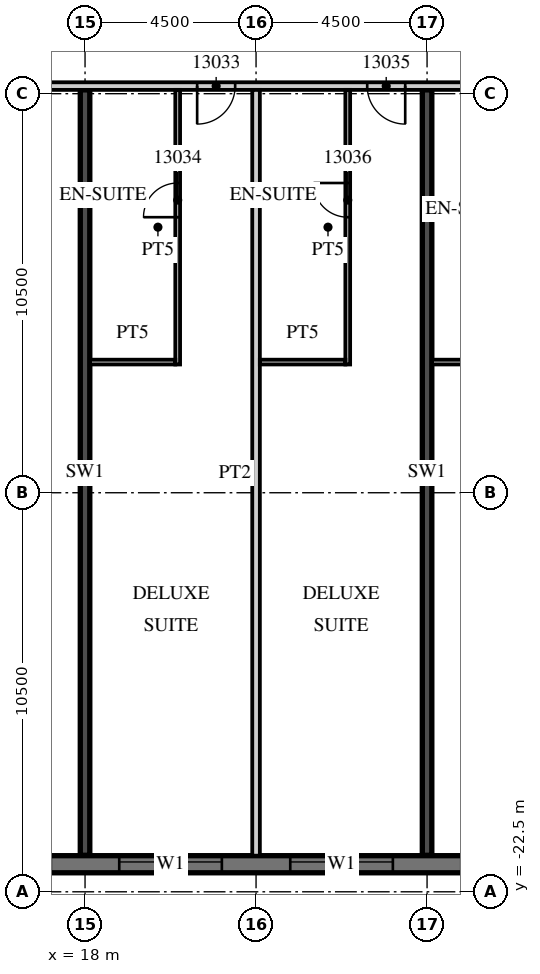
"""IFC4 building model, lengths in metres.
Left out: names, types, materials, properties, quantities, classifications, styles, units other than length and angle.
Written with IfcOpenShell. Run it as: python <this file> out.ifc"""

import sys

from ifc_helpers import new_model, si_unit, direction, frame, frame_2d, origin, place, context, subcontext, project, spatial, rectangle, extrude, element, fill, save


model = new_model("IFC4")
c1 = context("Model", 3, precision=1e-05, world=origin(), true_north=direction((0.0, 1.0)))
c2 = subcontext(c1, "Body", "Model", "MODEL_VIEW")
j1 = project(units=[si_unit("LENGTHUNIT", "METRE"), si_unit("PLANEANGLEUNIT", "RADIAN")], contexts=[c1])
p1 = place(None, origin())
s1 = spatial("IfcSite", under=j1, at=p1, CompositionType="ELEMENT")
p2 = place(p1, origin())
s2 = spatial("IfcBuilding", under=s1, at=p2, CompositionType="ELEMENT")
p3 = place(p2, frame((0.0, 0.0, 73.2)))
s3 = spatial("IfcBuildingStorey", under=s2, at=p3, CompositionType="ELEMENT", Elevation=73.2)
for number, where, z_axis, x_axis in (
    (1, (18.0, -21.54, 0.0), (0.0, 0.0, 1.0), (0.0, 1.0, 0.0)),
    (2, (27.0, -21.54, 0.0), (0.0, 0.0, 1.0), (0.0, 1.0, 0.0)),
):
    element("IfcWall", number, at=place(p3, frame(where, z_axis=z_axis, x_axis=x_axis)), inside=s3, PredefinedType="SHEAR", context=c2, shape_type="SweptSolid", body=[
        extrude(rectangle(XDim=20.14, YDim=0.25, at=frame_2d((10.07, 0.0))), origin(), (0.0, 0.0, 1.0), 3.3),
    ])
p4 = place(p3, frame((-13.5, -21.775, 0.0), z_axis=(0.0, 0.0, 1.0), x_axis=(1.0, 0.0, 0.0)))
e3 = element("IfcWall", 3, at=p4, inside=s3, PredefinedType="SOLIDWALL", context=c2, shape_type="SweptSolid", body=[
    extrude(rectangle(XDim=54.5, YDim=0.45, at=frame_2d((27.25, 0.0))), origin(), (0.0, 0.0, 1.0), 3.02),
])
p5 = place(p4, frame((0.9, 0.0, 0.45)))
e4 = element("IfcOpeningElement", 4, at=p5, cuts=e3, PredefinedType="OPENING", context=c2, shape_type="SweptSolid", body=[
    extrude(rectangle(XDim=2.7, YDim=2.25, at=frame_2d((1.35, 1.125))), frame((0.0, 0.235, 0.0), z_axis=(0.0, -1.0, 0.0), x_axis=(1.0, 0.0, 0.0)), (0.0, 0.0, 1.0), 0.47),
])
p6 = place(p4, frame((5.4, 0.0, 0.45)))
e5 = element("IfcOpeningElement", 5, at=p6, cuts=e3, PredefinedType="OPENING", context=c2, shape_type="SweptSolid", body=[
    extrude(rectangle(XDim=2.7, YDim=2.25, at=frame_2d((1.35, 1.125))), frame((0.0, 0.235, 0.0), z_axis=(0.0, -1.0, 0.0), x_axis=(1.0, 0.0, 0.0)), (0.0, 0.0, 1.0), 0.47),
])
p7 = place(p4, frame((9.9, 0.0, 0.45)))
e6 = element("IfcOpeningElement", 6, at=p7, cuts=e3, PredefinedType="OPENING", context=c2, shape_type="SweptSolid", body=[
    extrude(rectangle(XDim=2.7, YDim=2.25, at=frame_2d((1.35, 1.125))), frame((0.0, 0.235, 0.0), z_axis=(0.0, -1.0, 0.0), x_axis=(1.0, 0.0, 0.0)), (0.0, 0.0, 1.0), 0.47),
])
p8 = place(p4, frame((14.4, 0.0, 0.45)))
e7 = element("IfcOpeningElement", 7, at=p8, cuts=e3, PredefinedType="OPENING", context=c2, shape_type="SweptSolid", body=[
    extrude(rectangle(XDim=2.7, YDim=2.25, at=frame_2d((1.35, 1.125))), frame((0.0, 0.235, 0.0), z_axis=(0.0, -1.0, 0.0), x_axis=(1.0, 0.0, 0.0)), (0.0, 0.0, 1.0), 0.47),
])
p9 = place(p4, frame((18.9, 0.0, 0.45)))
e8 = element("IfcOpeningElement", 8, at=p9, cuts=e3, PredefinedType="OPENING", context=c2, shape_type="SweptSolid", body=[
    extrude(rectangle(XDim=2.7, YDim=2.25, at=frame_2d((1.35, 1.125))), frame((0.0, 0.235, 0.0), z_axis=(0.0, -1.0, 0.0), x_axis=(1.0, 0.0, 0.0)), (0.0, 0.0, 1.0), 0.47),
])
p10 = place(p4, frame((23.4, 0.0, 0.45)))
e9 = element("IfcOpeningElement", 9, at=p10, cuts=e3, PredefinedType="OPENING", context=c2, shape_type="SweptSolid", body=[
    extrude(rectangle(XDim=2.7, YDim=2.25, at=frame_2d((1.35, 1.125))), frame((0.0, 0.235, 0.0), z_axis=(0.0, -1.0, 0.0), x_axis=(1.0, 0.0, 0.0)), (0.0, 0.0, 1.0), 0.47),
])
p11 = place(p4, frame((27.9, 0.0, 0.45)))
e10 = element("IfcOpeningElement", 10, at=p11, cuts=e3, PredefinedType="OPENING", context=c2, shape_type="SweptSolid", body=[
    extrude(rectangle(XDim=2.7, YDim=2.25, at=frame_2d((1.35, 1.125))), frame((0.0, 0.235, 0.0), z_axis=(0.0, -1.0, 0.0), x_axis=(1.0, 0.0, 0.0)), (0.0, 0.0, 1.0), 0.47),
])
p12 = place(p4, frame((32.4, 0.0, 0.45)))
e11 = element("IfcOpeningElement", 11, at=p12, cuts=e3, PredefinedType="OPENING", context=c2, shape_type="SweptSolid", body=[
    extrude(rectangle(XDim=2.7, YDim=2.25, at=frame_2d((1.35, 1.125))), frame((0.0, 0.235, 0.0), z_axis=(0.0, -1.0, 0.0), x_axis=(1.0, 0.0, 0.0)), (0.0, 0.0, 1.0), 0.47),
])
p13 = place(p4, frame((36.9, 0.0, 0.45)))
e12 = element("IfcOpeningElement", 12, at=p13, cuts=e3, PredefinedType="OPENING", context=c2, shape_type="SweptSolid", body=[
    extrude(rectangle(XDim=2.7, YDim=2.25, at=frame_2d((1.35, 1.125))), frame((0.0, 0.235, 0.0), z_axis=(0.0, -1.0, 0.0), x_axis=(1.0, 0.0, 0.0)), (0.0, 0.0, 1.0), 0.47),
])
p14 = place(p4, frame((41.4, 0.0, 0.45)))
e13 = element("IfcOpeningElement", 13, at=p14, cuts=e3, PredefinedType="OPENING", context=c2, shape_type="SweptSolid", body=[
    extrude(rectangle(XDim=2.7, YDim=2.25, at=frame_2d((1.35, 1.125))), frame((0.0, 0.235, 0.0), z_axis=(0.0, -1.0, 0.0), x_axis=(1.0, 0.0, 0.0)), (0.0, 0.0, 1.0), 0.47),
])
p15 = place(p4, frame((45.9, 0.0, 0.45)))
e14 = element("IfcOpeningElement", 14, at=p15, cuts=e3, PredefinedType="OPENING", context=c2, shape_type="SweptSolid", body=[
    extrude(rectangle(XDim=2.7, YDim=2.25, at=frame_2d((1.35, 1.125))), frame((0.0, 0.235, 0.0), z_axis=(0.0, -1.0, 0.0), x_axis=(1.0, 0.0, 0.0)), (0.0, 0.0, 1.0), 0.47),
])
p16 = place(p4, frame((50.4, 0.0, 0.45)))
e15 = element("IfcOpeningElement", 15, at=p16, cuts=e3, PredefinedType="OPENING", context=c2, shape_type="SweptSolid", body=[
    extrude(rectangle(XDim=2.7, YDim=2.25, at=frame_2d((1.35, 1.125))), frame((0.0, 0.235, 0.0), z_axis=(0.0, -1.0, 0.0), x_axis=(1.0, 0.0, 0.0)), (0.0, 0.0, 1.0), 0.47),
])
p17 = place(p3, frame((-13.5, -1.3, 0.0), z_axis=(0.0, 0.0, 1.0), x_axis=(1.0, 0.0, 0.0)))
e16 = element("IfcWall", 16, at=p17, inside=s3, PredefinedType="PARTITIONING", context=c2, shape_type="SweptSolid", body=[
    extrude(rectangle(XDim=58.05, YDim=0.2, at=frame_2d((29.025, 0.0))), origin(), (0.0, 0.0, 1.0), 3.02),
])
p18 = place(p17, frame((2.925, 0.0, 0.0)))
e17 = element("IfcOpeningElement", 17, at=p18, cuts=e16, PredefinedType="OPENING", context=c2, shape_type="SweptSolid", body=[
    extrude(rectangle(XDim=1.0, YDim=2.1, at=frame_2d((0.5, 1.05))), frame((0.0, 0.11, 0.0), z_axis=(0.0, -1.0, 0.0), x_axis=(1.0, 0.0, 0.0)), (0.0, 0.0, 1.0), 0.22),
])
p19 = place(p17, frame((5.075, 0.0, 0.0)))
e18 = element("IfcOpeningElement", 18, at=p19, cuts=e16, PredefinedType="OPENING", context=c2, shape_type="SweptSolid", body=[
    extrude(rectangle(XDim=1.0, YDim=2.1, at=frame_2d((0.5, 1.05))), frame((0.0, 0.11, 0.0), z_axis=(0.0, -1.0, 0.0), x_axis=(1.0, 0.0, 0.0)), (0.0, 0.0, 1.0), 0.22),
])
p20 = place(p17, frame((9.55, 0.0, 0.0)))
e19 = element("IfcOpeningElement", 19, at=p20, cuts=e16, PredefinedType="OPENING", context=c2, shape_type="SweptSolid", body=[
    extrude(rectangle(XDim=1.0, YDim=2.1, at=frame_2d((0.5, 1.05))), frame((0.0, 0.11, 0.0), z_axis=(0.0, -1.0, 0.0), x_axis=(1.0, 0.0, 0.0)), (0.0, 0.0, 1.0), 0.22),
])
p21 = place(p17, frame((18.862, 0.0, 0.0)))
e20 = element("IfcOpeningElement", 20, at=p21, cuts=e16, PredefinedType="OPENING", context=c2, shape_type="SweptSolid", body=[
    extrude(rectangle(XDim=1.2, YDim=2.1, at=frame_2d((0.6, 1.05))), frame((0.0, 0.11, 0.0), z_axis=(0.0, -1.0, 0.0), x_axis=(1.0, 0.0, 0.0)), (0.0, 0.0, 1.0), 0.22),
])
p22 = place(p17, frame((27.862, 0.0, 0.0)))
e21 = element("IfcOpeningElement", 21, at=p22, cuts=e16, PredefinedType="OPENING", context=c2, shape_type="SweptSolid", body=[
    extrude(rectangle(XDim=1.2, YDim=2.1, at=frame_2d((0.6, 1.05))), frame((0.0, 0.11, 0.0), z_axis=(0.0, -1.0, 0.0), x_axis=(1.0, 0.0, 0.0)), (0.0, 0.0, 1.0), 0.22),
])
p23 = place(p17, frame((34.45, 0.0, 0.0)))
e22 = element("IfcOpeningElement", 22, at=p23, cuts=e16, PredefinedType="OPENING", context=c2, shape_type="SweptSolid", body=[
    extrude(rectangle(XDim=1.0, YDim=2.1, at=frame_2d((0.5, 1.05))), frame((0.0, 0.11, 0.0), z_axis=(0.0, -1.0, 0.0), x_axis=(1.0, 0.0, 0.0)), (0.0, 0.0, 1.0), 0.22),
])
p24 = place(p17, frame((38.925, 0.0, 0.0)))
e23 = element("IfcOpeningElement", 23, at=p24, cuts=e16, PredefinedType="OPENING", context=c2, shape_type="SweptSolid", body=[
    extrude(rectangle(XDim=1.0, YDim=2.1, at=frame_2d((0.5, 1.05))), frame((0.0, 0.11, 0.0), z_axis=(0.0, -1.0, 0.0), x_axis=(1.0, 0.0, 0.0)), (0.0, 0.0, 1.0), 0.22),
])
p25 = place(p17, frame((45.862, 0.0, 0.0)))
e24 = element("IfcOpeningElement", 24, at=p25, cuts=e16, PredefinedType="OPENING", context=c2, shape_type="SweptSolid", body=[
    extrude(rectangle(XDim=1.2, YDim=2.1, at=frame_2d((0.6, 1.05))), frame((0.0, 0.11, 0.0), z_axis=(0.0, -1.0, 0.0), x_axis=(1.0, 0.0, 0.0)), (0.0, 0.0, 1.0), 0.22),
])
p26 = place(p17, frame((50.075, 0.0, 0.0)))
e25 = element("IfcOpeningElement", 25, at=p26, cuts=e16, PredefinedType="OPENING", context=c2, shape_type="SweptSolid", body=[
    extrude(rectangle(XDim=1.0, YDim=2.1, at=frame_2d((0.5, 1.05))), frame((0.0, 0.11, 0.0), z_axis=(0.0, -1.0, 0.0), x_axis=(1.0, 0.0, 0.0)), (0.0, 0.0, 1.0), 0.22),
])
p27 = place(p17, frame((56.525, 0.0, 0.0)))
e26 = element("IfcOpeningElement", 26, at=p27, cuts=e16, PredefinedType="OPENING", context=c2, shape_type="SweptSolid", body=[
    extrude(rectangle(XDim=1.0, YDim=2.1, at=frame_2d((0.5, 1.05))), frame((0.0, 0.11, 0.0), z_axis=(0.0, -1.0, 0.0), x_axis=(1.0, 0.0, 0.0)), (0.0, 0.0, 1.0), 0.22),
])
p28 = place(p3, frame((22.5, -21.55, 0.0), z_axis=(0.0, 0.0, 1.0), x_axis=(0.0, 1.0, 0.0)))
e27 = element("IfcWall", 27, at=p28, inside=s3, PredefinedType="PARTITIONING", context=c2, shape_type="SweptSolid", body=[
    extrude(rectangle(XDim=20.15, YDim=0.2, at=frame_2d((10.075, 0.0))), origin(), (0.0, 0.0, 1.0), 3.02),
])
p29 = place(p3, frame((20.438, -8.625, 0.0), z_axis=(0.0, 0.0, 1.0), x_axis=(0.0, 1.0, 0.0)))
e28 = element("IfcWall", 28, at=p29, inside=s3, PredefinedType="PARTITIONING", context=c2, shape_type="SweptSolid", body=[
    extrude(rectangle(XDim=7.225, YDim=0.125, at=frame_2d((3.613, 0.0))), origin(), (0.0, 0.0, 1.0), 3.02),
])
p30 = place(p29, frame((3.875, 0.0, 0.0)))
e29 = element("IfcOpeningElement", 29, at=p30, cuts=e28, PredefinedType="OPENING", context=c2, shape_type="SweptSolid", body=[
    extrude(rectangle(XDim=0.9, YDim=2.1, at=frame_2d((0.45, 1.05))), frame((0.0, 0.073, 0.0), z_axis=(0.0, -1.0, 0.0), x_axis=(1.0, 0.0, 0.0)), (0.0, 0.0, 1.0), 0.145),
])
p31 = place(p3, frame((18.125, -8.562, 0.0), z_axis=(0.0, 0.0, 1.0), x_axis=(1.0, 0.0, 0.0)))
e30 = element("IfcWall", 30, at=p31, inside=s3, PredefinedType="PARTITIONING", context=c2, shape_type="SweptSolid", body=[
    extrude(rectangle(XDim=2.25, YDim=0.125, at=frame_2d((1.125, 0.0))), origin(), (0.0, 0.0, 1.0), 3.02),
])
p32 = place(p3, frame((24.913, -8.625, 0.0), z_axis=(0.0, 0.0, 1.0), x_axis=(0.0, 1.0, 0.0)))
e31 = element("IfcWall", 31, at=p32, inside=s3, PredefinedType="PARTITIONING", context=c2, shape_type="SweptSolid", body=[
    extrude(rectangle(XDim=7.225, YDim=0.125, at=frame_2d((3.613, 0.0))), origin(), (0.0, 0.0, 1.0), 3.02),
])
p33 = place(p32, frame((3.875, 0.0, 0.0)))
e32 = element("IfcOpeningElement", 32, at=p33, cuts=e31, PredefinedType="OPENING", context=c2, shape_type="SweptSolid", body=[
    extrude(rectangle(XDim=0.9, YDim=2.1, at=frame_2d((0.45, 1.05))), frame((0.0, 0.073, 0.0), z_axis=(0.0, -1.0, 0.0), x_axis=(1.0, 0.0, 0.0)), (0.0, 0.0, 1.0), 0.145),
])
p34 = place(p3, frame((22.6, -8.562, 0.0), z_axis=(0.0, 0.0, 1.0), x_axis=(1.0, 0.0, 0.0)))
e33 = element("IfcWall", 33, at=p34, inside=s3, PredefinedType="PARTITIONING", context=c2, shape_type="SweptSolid", body=[
    extrude(rectangle(XDim=2.25, YDim=0.125, at=frame_2d((1.125, 0.0))), origin(), (0.0, 0.0, 1.0), 3.02),
])
p35 = place(p3, frame((27.125, -8.562, 0.0), z_axis=(0.0, 0.0, 1.0), x_axis=(1.0, 0.0, 0.0)))
e34 = element("IfcWall", 34, at=p35, inside=s3, PredefinedType="PARTITIONING", context=c2, shape_type="SweptSolid", body=[
    extrude(rectangle(XDim=2.8, YDim=0.125, at=frame_2d((1.4, 0.0))), origin(), (0.0, 0.0, 1.0), 3.02),
])
p36 = place(p12, origin())
e35 = element("IfcWindow", 35, at=p36, inside=s3, PartitioningType="SINGLE_PANEL", PredefinedType="WINDOW", context=c2, shape_type="SweptSolid", body=[
    extrude(rectangle(XDim=2.7, YDim=2.25, at=frame_2d((1.35, 1.125))), frame((0.0, 0.09, 0.0), z_axis=(0.0, -1.0, 0.0), x_axis=(1.0, 0.0, 0.0)), (0.0, 0.0, 1.0), 0.06),
])
fill(e11, e35)
p37 = place(p13, origin())
e36 = element("IfcWindow", 36, at=p37, inside=s3, PartitioningType="SINGLE_PANEL", PredefinedType="WINDOW", context=c2, shape_type="SweptSolid", body=[
    extrude(rectangle(XDim=2.7, YDim=2.25, at=frame_2d((1.35, 1.125))), frame((0.0, 0.09, 0.0), z_axis=(0.0, -1.0, 0.0), x_axis=(1.0, 0.0, 0.0)), (0.0, 0.0, 1.0), 0.06),
])
fill(e12, e36)
p38 = place(p23, origin())
e37 = element("IfcDoor", 37, at=p38, inside=s3, OperationType="SINGLE_SWING_LEFT", PredefinedType="DOOR", context=c2, shape_type="SweptSolid", body=[
    extrude(rectangle(XDim=1.0, YDim=2.1, at=frame_2d((0.5, 1.05))), frame((0.0, 0.025, 0.0), z_axis=(0.0, -1.0, 0.0), x_axis=(1.0, 0.0, 0.0)), (0.0, 0.0, 1.0), 0.05),
])
fill(e22, e37)
p39 = place(p30, origin())
e38 = element("IfcDoor", 38, at=p39, inside=s3, OperationType="SINGLE_SWING_LEFT", PredefinedType="DOOR", context=c2, shape_type="SweptSolid", body=[
    extrude(rectangle(XDim=0.9, YDim=2.1, at=frame_2d((0.45, 1.05))), frame((0.0, 0.025, 0.0), z_axis=(0.0, -1.0, 0.0), x_axis=(1.0, 0.0, 0.0)), (0.0, 0.0, 1.0), 0.05),
])
fill(e29, e38)
p40 = place(p24, origin())
e39 = element("IfcDoor", 39, at=p40, inside=s3, OperationType="SINGLE_SWING_RIGHT", PredefinedType="DOOR", context=c2, shape_type="SweptSolid", body=[
    extrude(rectangle(XDim=1.0, YDim=2.1, at=frame_2d((0.5, 1.05))), frame((0.0, 0.025, 0.0), z_axis=(0.0, -1.0, 0.0), x_axis=(1.0, 0.0, 0.0)), (0.0, 0.0, 1.0), 0.05),
])
fill(e23, e39)
p41 = place(p33, origin())
e40 = element("IfcDoor", 40, at=p41, inside=s3, OperationType="SINGLE_SWING_RIGHT", PredefinedType="DOOR", context=c2, shape_type="SweptSolid", body=[
    extrude(rectangle(XDim=0.9, YDim=2.1, at=frame_2d((0.45, 1.05))), frame((0.0, 0.025, 0.0), z_axis=(0.0, -1.0, 0.0), x_axis=(1.0, 0.0, 0.0)), (0.0, 0.0, 1.0), 0.05),
])
fill(e32, e40)
save(model, sys.argv[1])
